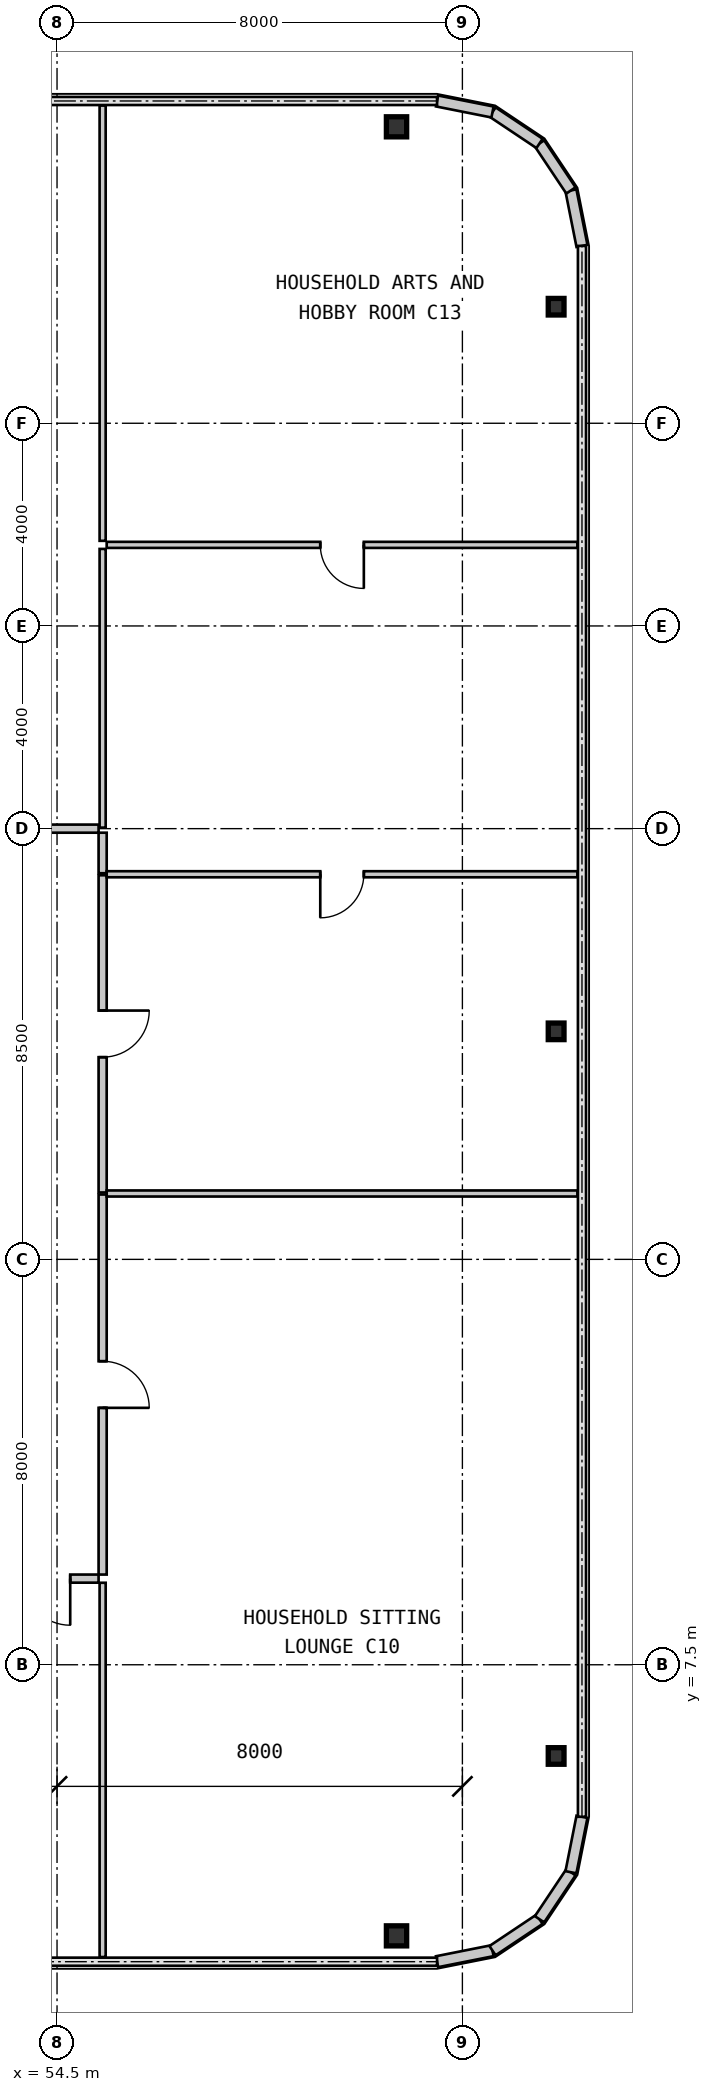
"""IFC4 building model, lengths in metres.
Left out: names, types, materials, properties, quantities, classifications, styles, units other than length and angle.
Written with IfcOpenShell. Run it as: python <this file> out.ifc"""

import sys

from ifc_helpers import new_model, si_unit, direction, frame, frame_2d, origin, origin_2d, place, context, subcontext, project, spatial, rectangle, i_section, extrude, source, transform, mapped, element, fill, save


model = new_model("IFC4")
c1 = context("Model", 3, precision=1e-05, world=origin(), true_north=direction((0.0, 1.0)))
c2 = subcontext(c1, "Body", "Model", "MODEL_VIEW")
j1 = project(units=[si_unit("LENGTHUNIT", "METRE"), si_unit("PLANEANGLEUNIT", "RADIAN")], contexts=[c1])
p1 = place(None, origin())
s1 = spatial("IfcSite", under=j1, at=p1, CompositionType="ELEMENT")
p2 = place(p1, origin())
s2 = spatial("IfcBuilding", under=s1, at=p2, CompositionType="ELEMENT")
p3 = place(p2, frame((0.0, 0.0, 45.15)))
s3 = spatial("IfcBuildingStorey", under=s2, at=p3, CompositionType="ELEMENT", Elevation=45.15)
m1 = source(origin(), c2, "Body", "SweptSolid", [
    extrude(i_section(OverallWidth=0.4, OverallDepth=0.396, WebThickness=0.022, FlangeThickness=0.034, at=origin_2d()), origin(), (0.0, 0.0, 1.0), 3.15),
])
for number, where, z_axis, x_axis in (
    (1, (61.2, 2.15, 0.0), (0.0, 0.0, 1.0), (1.0, 0.0, 0.0)),
    (2, (61.2, 37.85, 0.0), (0.0, 0.0, 1.0), (1.0, 0.0, 0.0)),
):
    element("IfcColumn", number, at=place(p3, frame(where, z_axis=z_axis, x_axis=x_axis)), inside=s3, PredefinedType="COLUMN", context=c2, shape_type="MappedRepresentation", body=[
        mapped(m1, transform((0.0, 0.0, 0.0), scale=1.0)),
    ])
m2 = source(origin(), c2, "Body", "SweptSolid", [
    extrude(i_section(OverallWidth=0.311, OverallDepth=0.327, WebThickness=0.016, FlangeThickness=0.025, at=origin_2d()), origin(), (0.0, 0.0, 1.0), 3.15),
])
for number, where, z_axis, x_axis in (
    (3, (64.35, 5.7, 0.0), (0.0, 0.0, 1.0), (1.0, 0.0, 0.0)),
    (4, (64.35, 20.0, 0.0), (0.0, 0.0, 1.0), (1.0, 0.0, 0.0)),
    (5, (64.35, 34.3, 0.0), (0.0, 0.0, 1.0), (1.0, 0.0, 0.0)),
):
    element("IfcColumn", number, at=place(p3, frame(where, z_axis=z_axis, x_axis=x_axis)), inside=s3, PredefinedType="COLUMN", context=c2, shape_type="MappedRepresentation", body=[
        mapped(m2, transform((0.0, 0.0, 0.0), scale=1.0)),
    ])
m3 = source(origin(), c2, "Body", "SweptSolid", [
    extrude(rectangle(XDim=1.116, YDim=0.22, at=frame_2d((0.558, 0.0))), origin(), (0.0, 0.0, 1.0), 2.93),
])
for number, where, z_axis, x_axis in (
    (6, (62.0, 1.64, 0.0), (0.0, 0.0, 1.0), (0.981, 0.195, 0.0)),
    (7, (63.094, 1.858, 0.0), (0.0, 0.0, 1.0), (0.831, 0.556, 0.0)),
    (8, (64.022, 2.478, 0.0), (0.0, 0.0, 1.0), (0.556, 0.831, 0.0)),
    (9, (64.642, 3.406, 0.0), (0.0, 0.0, 1.0), (0.195, 0.981, 0.0)),
    (10, (64.86, 35.5, 0.0), (0.0, 0.0, 1.0), (-0.195, 0.981, 0.0)),
    (11, (64.642, 36.594, 0.0), (0.0, 0.0, 1.0), (-0.556, 0.831, 0.0)),
    (12, (64.022, 37.522, 0.0), (0.0, 0.0, 1.0), (-0.831, 0.556, 0.0)),
    (13, (63.094, 38.142, 0.0), (0.0, 0.0, 1.0), (-0.981, 0.195, 0.0)),
):
    element("IfcWall", number, at=place(p3, frame(where, z_axis=z_axis, x_axis=x_axis)), inside=s3, PredefinedType="SOLIDWALL", context=c2, shape_type="MappedRepresentation", body=[
        mapped(m3, transform((0.0, 0.0, 0.0), scale=1.0)),
    ])
m4 = source(origin(), c2, "Body", "SweptSolid", [
    extrude(rectangle(XDim=2.04, YDim=0.16, at=frame_2d((1.02, 0.0))), origin(), (0.0, 0.0, 1.0), 2.93),
])
p4 = place(p3, frame((55.32, 9.2, 0.0), z_axis=(0.0, 0.0, 1.0), x_axis=(-1.0, 0.0, 0.0)))
e14 = element("IfcWall", 14, at=p4, inside=s3, PredefinedType="PARTITIONING", context=c2, shape_type="MappedRepresentation", body=[
    mapped(m4, transform((0.0, 0.0, 0.0), scale=1.0)),
])
m5 = source(origin(), c2, "Body", "SweptSolid", [
    extrude(rectangle(XDim=0.92, YDim=2.1, at=frame_2d((0.46, 1.05))), frame((0.0, 0.09, 0.0), z_axis=(0.0, -1.0, 0.0), x_axis=(1.0, 0.0, 0.0)), (0.0, 0.0, 1.0), 0.18),
])
p5 = place(p4, frame((0.56, 0.0, 0.0)))
e15 = element("IfcOpeningElement", 15, at=p5, cuts=e14, PredefinedType="OPENING", context=c2, shape_type="MappedRepresentation", body=[
    mapped(m5, transform((0.0, 0.0, 0.0), scale=1.0)),
])
m6 = source(origin(), c2, "Body", "SweptSolid", [
    extrude(rectangle(XDim=7.5, YDim=0.16, at=frame_2d((3.75, 0.0))), origin(), (0.0, 0.0, 1.0), 2.93),
])
p6 = place(p3, frame((55.4, 16.78, 0.0), z_axis=(0.0, 0.0, 1.0), x_axis=(0.0, -1.0, 0.0)))
e16 = element("IfcWall", 16, at=p6, inside=s3, PredefinedType="PARTITIONING", context=c2, shape_type="MappedRepresentation", body=[
    mapped(m6, transform((0.0, 0.0, 0.0), scale=1.0)),
])
p7 = place(p6, frame((3.29, 0.0, 0.0)))
e17 = element("IfcOpeningElement", 17, at=p7, cuts=e16, PredefinedType="OPENING", context=c2, shape_type="MappedRepresentation", body=[
    mapped(m5, transform((0.0, 0.0, 0.0), scale=1.0)),
])
m7 = source(origin(), c2, "Body", "SweptSolid", [
    extrude(rectangle(XDim=6.26, YDim=0.16, at=frame_2d((3.13, 0.0))), origin(), (0.0, 0.0, 1.0), 2.93),
])
p8 = place(p3, frame((55.4, 23.08, 0.0), z_axis=(0.0, 0.0, 1.0), x_axis=(0.0, -1.0, 0.0)))
e18 = element("IfcWall", 18, at=p8, inside=s3, PredefinedType="PARTITIONING", context=c2, shape_type="MappedRepresentation", body=[
    mapped(m7, transform((0.0, 0.0, 0.0), scale=1.0)),
])
p9 = place(p8, frame((2.67, 0.0, 0.0)))
e19 = element("IfcOpeningElement", 19, at=p9, cuts=e18, PredefinedType="OPENING", context=c2, shape_type="MappedRepresentation", body=[
    mapped(m5, transform((0.0, 0.0, 0.0), scale=1.0)),
])
m8 = source(origin(), c2, "Body", "SweptSolid", [
    extrude(rectangle(XDim=0.8, YDim=0.16, at=frame_2d((0.4, 0.0))), origin(), (0.0, 0.0, 1.0), 2.93),
])
p10 = place(p3, frame((55.4, 23.92, 0.0), z_axis=(0.0, 0.0, 1.0), x_axis=(0.0, -1.0, 0.0)))
e20 = element("IfcWall", 20, at=p10, inside=s3, PredefinedType="PARTITIONING", context=c2, shape_type="MappedRepresentation", body=[
    mapped(m8, transform((0.0, 0.0, 0.0), scale=1.0)),
])
m9 = source(origin(), c2, "Body", "SweptSolid", [
    extrude(rectangle(XDim=4.13, YDim=0.16, at=frame_2d((2.065, 0.0))), origin(), (0.0, 0.0, 1.0), 2.93),
])
p11 = place(p3, frame((51.19, 24.0, 0.0), z_axis=(0.0, 0.0, 1.0), x_axis=(1.0, 0.0, 0.0)))
e21 = element("IfcWall", 21, at=p11, inside=s3, PredefinedType="PARTITIONING", context=c2, shape_type="MappedRepresentation", body=[
    mapped(m9, transform((0.0, 0.0, 0.0), scale=1.0)),
])
m10 = source(origin(), c2, "Body", "SweptSolid", [
    extrude(rectangle(XDim=7.386, YDim=0.12, at=frame_2d((3.693, 0.0))), origin(), (0.0, 0.0, 1.0), 2.93),
])
p12 = place(p3, frame((55.4, 9.118, 0.0), z_axis=(0.0, 0.0, 1.0), x_axis=(0.0, -1.0, 0.0)))
e22 = element("IfcWall", 22, at=p12, inside=s3, PredefinedType="PARTITIONING", context=c2, shape_type="MappedRepresentation", body=[
    mapped(m10, transform((0.0, 0.0, 0.0), scale=1.0)),
])
m11 = source(origin(), c2, "Body", "SweptSolid", [
    extrude(rectangle(XDim=9.29, YDim=0.12, at=frame_2d((4.645, 0.0))), origin(), (0.0, 0.0, 1.0), 2.93),
])
p13 = place(p3, frame((55.48, 16.8, 0.0), z_axis=(0.0, 0.0, 1.0), x_axis=(1.0, 0.0, 0.0)))
e23 = element("IfcWall", 23, at=p13, inside=s3, PredefinedType="PARTITIONING", context=c2, shape_type="MappedRepresentation", body=[
    mapped(m11, transform((0.0, 0.0, 0.0), scale=1.0)),
])
p14 = place(p3, frame((55.48, 23.1, 0.0), z_axis=(0.0, 0.0, 1.0), x_axis=(1.0, 0.0, 0.0)))
e24 = element("IfcWall", 24, at=p14, inside=s3, PredefinedType="PARTITIONING", context=c2, shape_type="MappedRepresentation", body=[
    mapped(m11, transform((0.0, 0.0, 0.0), scale=1.0)),
])
m12 = source(origin(), c2, "Body", "SweptSolid", [
    extrude(rectangle(XDim=0.86, YDim=2.1, at=frame_2d((0.43, 1.05))), frame((0.0, 0.07, 0.0), z_axis=(0.0, -1.0, 0.0), x_axis=(1.0, 0.0, 0.0)), (0.0, 0.0, 1.0), 0.14),
])
p15 = place(p14, frame((4.215, 0.0, 0.0)))
e25 = element("IfcOpeningElement", 25, at=p15, cuts=e24, PredefinedType="OPENING", context=c2, shape_type="MappedRepresentation", body=[
    mapped(m12, transform((0.0, 0.0, 0.0), scale=1.0)),
])
p16 = place(p3, frame((55.48, 29.6, 0.0), z_axis=(0.0, 0.0, 1.0), x_axis=(1.0, 0.0, 0.0)))
e26 = element("IfcWall", 26, at=p16, inside=s3, PredefinedType="PARTITIONING", context=c2, shape_type="MappedRepresentation", body=[
    mapped(m11, transform((0.0, 0.0, 0.0), scale=1.0)),
])
p17 = place(p16, frame((4.215, 0.0, 0.0)))
e27 = element("IfcOpeningElement", 27, at=p17, cuts=e26, PredefinedType="OPENING", context=c2, shape_type="MappedRepresentation", body=[
    mapped(m12, transform((0.0, 0.0, 0.0), scale=1.0)),
])
m13 = source(origin(), c2, "Body", "SweptSolid", [
    extrude(rectangle(XDim=5.5, YDim=0.12, at=frame_2d((2.75, 0.0))), origin(), (0.0, 0.0, 1.0), 2.93),
])
p18 = place(p3, frame((55.4, 24.02, 0.0), z_axis=(0.0, 0.0, 1.0), x_axis=(0.0, 1.0, 0.0)))
e28 = element("IfcWall", 28, at=p18, inside=s3, PredefinedType="PARTITIONING", context=c2, shape_type="MappedRepresentation", body=[
    mapped(m13, transform((0.0, 0.0, 0.0), scale=1.0)),
])
m14 = source(origin(), c2, "Body", "SweptSolid", [
    extrude(rectangle(XDim=8.59, YDim=0.12, at=frame_2d((4.295, 0.0))), origin(), (0.0, 0.0, 1.0), 2.93),
])
p19 = place(p3, frame((55.4, 29.68, 0.0), z_axis=(0.0, 0.0, 1.0), x_axis=(0.0, 1.0, 0.0)))
e29 = element("IfcWall", 29, at=p19, inside=s3, PredefinedType="PARTITIONING", context=c2, shape_type="MappedRepresentation", body=[
    mapped(m14, transform((0.0, 0.0, 0.0), scale=1.0)),
])
m15 = source(origin(), c2, "Body", "SweptSolid", [
    extrude(rectangle(XDim=0.92, YDim=2.1, at=frame_2d((0.46, 1.05))), frame((0.0, 0.025, 0.0), z_axis=(0.0, -1.0, 0.0), x_axis=(1.0, 0.0, 0.0)), (0.0, 0.0, 1.0), 0.05),
])
p20 = place(p5, origin())
e30 = element("IfcDoor", 30, at=p20, inside=s3, OperationType="SINGLE_SWING_LEFT", PredefinedType="DOOR", context=c2, shape_type="MappedRepresentation", body=[
    mapped(m15, transform((0.0, 0.0, 0.0), scale=1.0)),
])
fill(e15, e30)
p21 = place(p7, origin())
e31 = element("IfcDoor", 31, at=p21, inside=s3, OperationType="SINGLE_SWING_RIGHT", PredefinedType="DOOR", context=c2, shape_type="MappedRepresentation", body=[
    mapped(m15, transform((0.0, 0.0, 0.0), scale=1.0)),
])
fill(e17, e31)
p22 = place(p9, origin())
e32 = element("IfcDoor", 32, at=p22, inside=s3, OperationType="SINGLE_SWING_LEFT", PredefinedType="DOOR", context=c2, shape_type="MappedRepresentation", body=[
    mapped(m15, transform((0.0, 0.0, 0.0), scale=1.0)),
])
fill(e19, e32)
m16 = source(origin(), c2, "Body", "SweptSolid", [
    extrude(rectangle(XDim=0.86, YDim=2.1, at=frame_2d((0.43, 1.05))), frame((0.0, 0.025, 0.0), z_axis=(0.0, -1.0, 0.0), x_axis=(1.0, 0.0, 0.0)), (0.0, 0.0, 1.0), 0.05),
])
p23 = place(p15, frame((0.86, 0.0, 0.0), z_axis=(0.0, 0.0, 1.0), x_axis=(-1.0, 0.0, 0.0)))
e33 = element("IfcDoor", 33, at=p23, inside=s3, OperationType="SINGLE_SWING_RIGHT", PredefinedType="DOOR", context=c2, shape_type="MappedRepresentation", body=[
    mapped(m16, transform((0.0, 0.0, 0.0), scale=1.0)),
])
fill(e25, e33)
p24 = place(p17, frame((0.86, 0.0, 0.0), z_axis=(0.0, 0.0, 1.0), x_axis=(-1.0, 0.0, 0.0)))
e34 = element("IfcDoor", 34, at=p24, inside=s3, OperationType="SINGLE_SWING_LEFT", PredefinedType="DOOR", context=c2, shape_type="MappedRepresentation", body=[
    mapped(m16, transform((0.0, 0.0, 0.0), scale=1.0)),
])
fill(e27, e34)
save(model, sys.argv[1])
